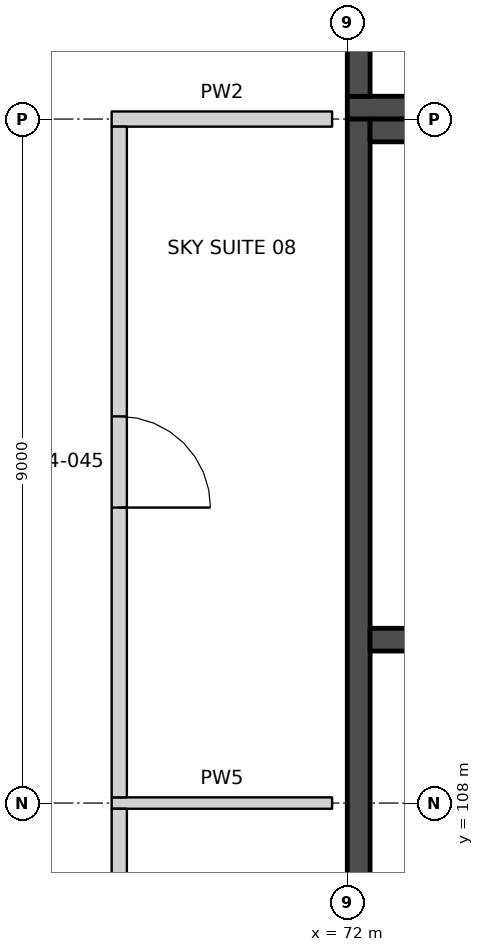
"""IFC4 building model, lengths in metres.
Left out: names, types, materials, properties, quantities, classifications, styles, units other than length and angle.
Written with IfcOpenShell. Run it as: python <this file> out.ifc"""

import sys

from ifc_helpers import new_model, si_unit, direction, frame, frame_2d, origin, place, context, subcontext, project, spatial, rectangle, extrude, element, fill, save


model = new_model("IFC4")
c1 = context("Model", 3, precision=1e-05, world=origin(), true_north=direction((0.0, 1.0)))
c2 = subcontext(c1, "Body", "Model", "MODEL_VIEW")
j1 = project(units=[si_unit("LENGTHUNIT", "METRE"), si_unit("PLANEANGLEUNIT", "RADIAN")], contexts=[c1])
p1 = place(None, origin())
s1 = spatial("IfcSite", under=j1, at=p1, CompositionType="ELEMENT")
p2 = place(p1, origin())
s2 = spatial("IfcBuilding", under=s1, at=p2, CompositionType="ELEMENT")
p3 = place(p2, frame((0.0, 0.0, 28.0)))
s3 = spatial("IfcBuildingStorey", under=s2, at=p3, CompositionType="ELEMENT", Elevation=28.0)
p4 = place(p3, frame((68.9, 108.0, 0.0), z_axis=(0.0, 0.0, 1.0), x_axis=(1.0, 0.0, 0.0)))
e1 = element("IfcWall", 1, at=p4, inside=s3, PredefinedType="PARTITIONING", context=c2, shape_type="SweptSolid", body=[
    extrude(rectangle(XDim=2.9, YDim=0.15, at=frame_2d((1.45, 0.0))), origin(), (0.0, 0.0, 1.0), 4.2),
])
p5 = place(p3, frame((68.9, 117.0, 0.0), z_axis=(0.0, 0.0, 1.0), x_axis=(1.0, 0.0, 0.0)))
e2 = element("IfcWall", 2, at=p5, inside=s3, PredefinedType="PARTITIONING", context=c2, shape_type="SweptSolid", body=[
    extrude(rectangle(XDim=2.9, YDim=0.2, at=frame_2d((1.45, 0.0))), origin(), (0.0, 0.0, 1.0), 4.2),
])
p6 = place(p3, frame((69.0, 99.075, 0.0), z_axis=(0.0, 0.0, 1.0), x_axis=(0.0, 1.0, 0.0)))
e3 = element("IfcWall", 3, at=p6, inside=s3, PredefinedType="PARTITIONING", context=c2, shape_type="SweptSolid", body=[
    extrude(rectangle(XDim=8.85, YDim=0.2, at=frame_2d((4.425, 0.0))), origin(), (0.0, 0.0, 1.0), 5.5),
])
p7 = place(p6, frame((3.825, 0.0, 0.0)))
e4 = element("IfcOpeningElement", 4, at=p7, cuts=e3, PredefinedType="OPENING", context=c2, shape_type="SweptSolid", body=[
    extrude(rectangle(XDim=1.2, YDim=2.1, at=frame_2d((0.6, 1.05))), frame((0.0, 0.11, 0.0), z_axis=(0.0, -1.0, 0.0), x_axis=(1.0, 0.0, 0.0)), (0.0, 0.0, 1.0), 0.22),
])
p8 = place(p3, frame((69.0, 108.075, 0.0), z_axis=(0.0, 0.0, 1.0), x_axis=(0.0, 1.0, 0.0)))
e5 = element("IfcWall", 5, at=p8, inside=s3, PredefinedType="PARTITIONING", context=c2, shape_type="SweptSolid", body=[
    extrude(rectangle(XDim=8.825, YDim=0.2, at=frame_2d((4.413, 0.0))), origin(), (0.0, 0.0, 1.0), 5.5),
])
p9 = place(p8, frame((3.813, 0.0, 0.0)))
e6 = element("IfcOpeningElement", 6, at=p9, cuts=e5, PredefinedType="OPENING", context=c2, shape_type="SweptSolid", body=[
    extrude(rectangle(XDim=1.2, YDim=2.1, at=frame_2d((0.6, 1.05))), frame((0.0, 0.11, 0.0), z_axis=(0.0, -1.0, 0.0), x_axis=(1.0, 0.0, 0.0)), (0.0, 0.0, 1.0), 0.22),
])
p10 = place(p3, frame((90.0, 117.15, 0.0), z_axis=(0.0, 0.0, 1.0), x_axis=(-1.0, 0.0, 0.0)))
e7 = element("IfcWall", 7, at=p10, inside=s3, PredefinedType="SHEAR", context=c2, shape_type="SweptSolid", body=[
    extrude(rectangle(XDim=18.0, YDim=0.3, at=frame_2d((9.0, 0.0))), origin(), (0.0, 0.0, 1.0), 5.5),
])
p11 = place(p10, frame((1.5, 0.0, 0.0)))
e8 = element("IfcOpeningElement", 8, at=p11, cuts=e7, PredefinedType="OPENING", context=c2, shape_type="SweptSolid", body=[
    extrude(rectangle(XDim=1.2, YDim=2.1, at=frame_2d((0.6, 1.05))), frame((0.0, 0.16, 0.0), z_axis=(0.0, -1.0, 0.0), x_axis=(1.0, 0.0, 0.0)), (0.0, 0.0, 1.0), 0.32),
])
p12 = place(p3, frame((72.15, 117.3, 0.0), z_axis=(0.0, 0.0, 1.0), x_axis=(0.0, 1.0, 0.0)))
e9 = element("IfcWall", 9, at=p12, inside=s3, PredefinedType="SHEAR", context=c2, shape_type="SweptSolid", body=[
    extrude(rectangle(XDim=8.4, YDim=0.3, at=frame_2d((4.2, 0.0))), origin(), (0.0, 0.0, 1.0), 5.5),
])
p13 = place(p3, frame((72.15, 99.0, 0.0), z_axis=(0.0, 0.0, 1.0), x_axis=(0.0, 1.0, 0.0)))
e10 = element("IfcWall", 10, at=p13, inside=s3, PredefinedType="SHEAR", context=c2, shape_type="SweptSolid", body=[
    extrude(rectangle(XDim=18.0, YDim=0.3, at=frame_2d((9.0, 0.0))), origin(), (0.0, 0.0, 1.0), 5.5),
])
for number, where, z_axis, x_axis in (
    (11, (80.7, 116.85, 0.0), (0.0, 0.0, 1.0), (-1.0, 0.0, 0.0)),
    (12, (80.7, 110.15, 0.0), (0.0, 0.0, 1.0), (-1.0, 0.0, 0.0)),
):
    element("IfcWall", number, at=place(p3, frame(where, z_axis=z_axis, x_axis=x_axis)), inside=s3, PredefinedType="SHEAR", context=c2, shape_type="SweptSolid", body=[
        extrude(rectangle(XDim=8.4, YDim=0.3, at=frame_2d((4.2, 0.0))), origin(), (0.0, 0.0, 1.0), 5.5),
    ])
p14 = place(p9, frame((1.2, 0.0, 0.0), z_axis=(0.0, 0.0, 1.0), x_axis=(-1.0, 0.0, 0.0)))
e13 = element("IfcDoor", 13, at=p14, inside=s3, OperationType="SINGLE_SWING_RIGHT", PredefinedType="DOOR", context=c2, shape_type="SweptSolid", body=[
    extrude(rectangle(XDim=1.2, YDim=2.1, at=frame_2d((0.6, 1.05))), frame((0.0, 0.025, 0.0), z_axis=(0.0, -1.0, 0.0), x_axis=(1.0, 0.0, 0.0)), (0.0, 0.0, 1.0), 0.05),
])
fill(e6, e13)
save(model, sys.argv[1])
